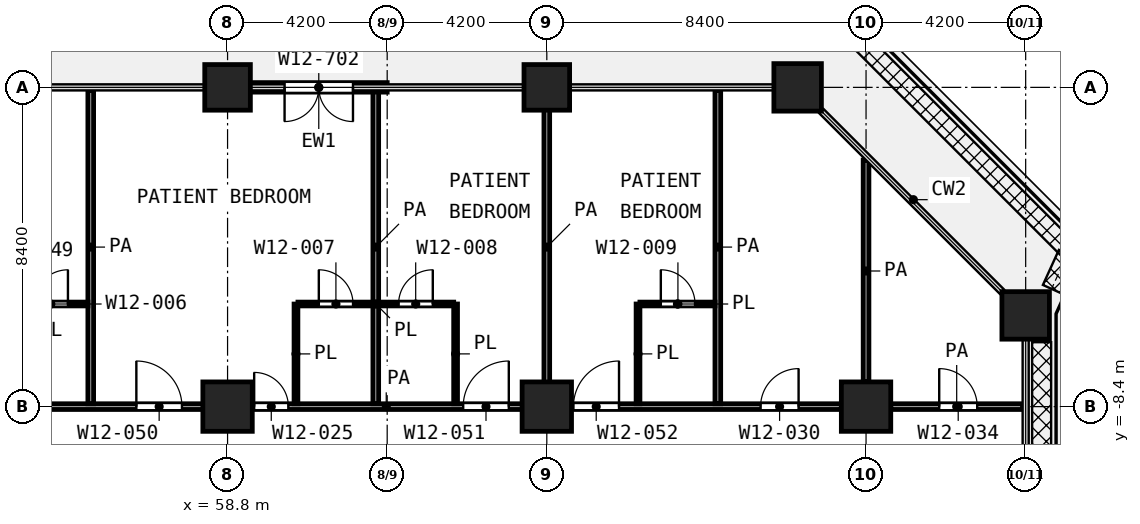
"""IFC4 building model, lengths in metres.
Left out: names, types, materials, properties, quantities, classifications, styles, units other than length and angle.
Written with IfcOpenShell. Run it as: python <this file> out.ifc"""

import sys

from ifc_helpers import new_model, si_unit, direction, frame, frame_2d, origin, origin_2d, place, context, subcontext, project, spatial, rectangle, extrude, element, fill, save


model = new_model("IFC4")
c1 = context("Model", 3, precision=1e-05, world=origin(), true_north=direction((0.0, 1.0)))
c2 = subcontext(c1, "Body", "Model", "MODEL_VIEW")
j1 = project(units=[si_unit("LENGTHUNIT", "METRE"), si_unit("PLANEANGLEUNIT", "RADIAN")], contexts=[c1])
p1 = place(None, origin())
s1 = spatial("IfcSite", under=j1, at=p1, CompositionType="ELEMENT")
p2 = place(p1, origin())
s2 = spatial("IfcBuilding", under=s1, at=p2, CompositionType="ELEMENT")
p3 = place(p2, frame((0.0, 0.0, 56.0)))
s3 = spatial("IfcBuildingStorey", under=s2, at=p3, CompositionType="ELEMENT", Elevation=56.0)
for number, where, z_axis, x_axis in (
    (1, (58.8, 0.0, 0.0), (0.0, 0.0, 1.0), (1.0, 0.0, 0.0)),
    (2, (67.2, 0.0, 0.0), (0.0, 0.0, 1.0), (1.0, 0.0, 0.0)),
):
    element("IfcColumn", number, at=place(p3, frame(where, z_axis=z_axis, x_axis=x_axis)), inside=s3, PredefinedType="COLUMN", context=c2, shape_type="SweptSolid", body=[
        extrude(rectangle(XDim=1.2, YDim=1.2, at=origin_2d()), origin(), (0.0, 0.0, 1.0), 4.2),
    ])
for number, where, z_axis, x_axis in (
    (3, (73.8, 0.0, 0.0), (0.0, 0.0, 1.0), (1.0, 0.0, 0.0)),
    (4, (79.8, -6.0, 0.0), (0.0, 0.0, 1.0), (1.0, 0.0, 0.0)),
):
    element("IfcColumn", number, at=place(p3, frame(where, z_axis=z_axis, x_axis=x_axis)), inside=s3, PredefinedType="COLUMN", context=c2, shape_type="SweptSolid", body=[
        extrude(rectangle(XDim=1.25, YDim=1.25, at=origin_2d()), origin(), (0.0, 0.0, 1.0), 4.2),
    ])
for number, where, z_axis, x_axis in (
    (5, (58.8, -8.4, 0.0), (0.0, 0.0, 1.0), (1.0, 0.0, 0.0)),
    (6, (67.2, -8.4, 0.0), (0.0, 0.0, 1.0), (1.0, 0.0, 0.0)),
    (7, (75.6, -8.4, 0.0), (0.0, 0.0, 1.0), (1.0, 0.0, 0.0)),
):
    element("IfcColumn", number, at=place(p3, frame(where, z_axis=z_axis, x_axis=x_axis)), inside=s3, PredefinedType="COLUMN", context=c2, shape_type="SweptSolid", body=[
        extrude(rectangle(XDim=1.3, YDim=1.3, at=origin_2d()), origin(), (0.0, 0.0, 1.0), 4.2),
    ])
p4 = place(p3, frame((63.0, 0.0, 0.0), z_axis=(0.0, 0.0, 1.0), x_axis=(-1.0, 0.0, 0.0)))
e8 = element("IfcWall", 8, at=p4, inside=s3, PredefinedType="SOLIDWALL", context=c2, shape_type="SweptSolid", body=[
    extrude(rectangle(XDim=3.6, YDim=0.25, at=frame_2d((1.8, 0.0))), origin(), (0.0, 0.0, 1.0), 3.78),
])
p5 = place(p4, frame((0.9, 0.0, 0.0)))
e9 = element("IfcOpeningElement", 9, at=p5, cuts=e8, PredefinedType="OPENING", context=c2, shape_type="SweptSolid", body=[
    extrude(rectangle(XDim=1.8, YDim=2.1, at=frame_2d((0.9, 1.05))), frame((0.0, 0.135, 0.0), z_axis=(0.0, -1.0, 0.0), x_axis=(1.0, 0.0, 0.0)), (0.0, 0.0, 1.0), 0.27),
])
p6 = place(p3, frame((53.15, -5.7, 0.0), z_axis=(0.0, 0.0, 1.0), x_axis=(1.0, 0.0, 0.0)))
e10 = element("IfcWall", 10, at=p6, inside=s3, PredefinedType="PARTITIONING", context=c2, shape_type="SweptSolid", body=[
    extrude(rectangle(XDim=1.975, YDim=0.1, at=frame_2d((0.988, 0.0))), origin(), (0.0, 0.0, 1.0), 3.9),
])
p7 = place(p6, frame((0.55, 0.0, 0.0)))
e11 = element("IfcOpeningElement", 11, at=p7, cuts=e10, PredefinedType="OPENING", context=c2, shape_type="SweptSolid", body=[
    extrude(rectangle(XDim=0.9, YDim=2.1, at=frame_2d((0.45, 1.05))), frame((0.0, 0.06, 0.0), z_axis=(0.0, -1.0, 0.0), x_axis=(1.0, 0.0, 0.0)), (0.0, 0.0, 1.0), 0.12),
])
p8 = place(p3, frame((60.652, -5.7, 0.0), z_axis=(0.0, 0.0, 1.0), x_axis=(1.0, 0.0, 0.0)))
e12 = element("IfcWall", 12, at=p8, inside=s3, PredefinedType="PARTITIONING", context=c2, shape_type="SweptSolid", body=[
    extrude(rectangle(XDim=4.098, YDim=0.1, at=frame_2d((2.049, 0.0))), origin(), (0.0, 0.0, 1.0), 3.9),
])
p9 = place(p8, frame((0.549, 0.0, 0.0)))
e13 = element("IfcOpeningElement", 13, at=p9, cuts=e12, PredefinedType="OPENING", context=c2, shape_type="SweptSolid", body=[
    extrude(rectangle(XDim=0.9, YDim=2.1, at=frame_2d((0.45, 1.05))), frame((0.0, 0.06, 0.0), z_axis=(0.0, -1.0, 0.0), x_axis=(1.0, 0.0, 0.0)), (0.0, 0.0, 1.0), 0.12),
])
p10 = place(p8, frame((2.648, 0.0, 0.0)))
e14 = element("IfcOpeningElement", 14, at=p10, cuts=e12, PredefinedType="OPENING", context=c2, shape_type="SweptSolid", body=[
    extrude(rectangle(XDim=0.9, YDim=2.1, at=frame_2d((0.45, 1.05))), frame((0.0, 0.06, 0.0), z_axis=(0.0, -1.0, 0.0), x_axis=(1.0, 0.0, 0.0)), (0.0, 0.0, 1.0), 0.12),
])
p11 = place(p3, frame((69.65, -5.7, 0.0), z_axis=(0.0, 0.0, 1.0), x_axis=(1.0, 0.0, 0.0)))
e15 = element("IfcWall", 15, at=p11, inside=s3, PredefinedType="PARTITIONING", context=c2, shape_type="SweptSolid", body=[
    extrude(rectangle(XDim=1.975, YDim=0.1, at=frame_2d((0.988, 0.0))), origin(), (0.0, 0.0, 1.0), 3.9),
])
p12 = place(p11, frame((0.55, 0.0, 0.0)))
e16 = element("IfcOpeningElement", 16, at=p12, cuts=e15, PredefinedType="OPENING", context=c2, shape_type="SweptSolid", body=[
    extrude(rectangle(XDim=0.9, YDim=2.1, at=frame_2d((0.45, 1.05))), frame((0.0, 0.06, 0.0), z_axis=(0.0, -1.0, 0.0), x_axis=(1.0, 0.0, 0.0)), (0.0, 0.0, 1.0), 0.12),
])
p13 = place(p3, frame((60.6, -8.325, 0.0), z_axis=(0.0, 0.0, 1.0), x_axis=(0.0, 1.0, 0.0)))
e17 = element("IfcWall", 17, at=p13, inside=s3, PredefinedType="PARTITIONING", context=c2, shape_type="SweptSolid", body=[
    extrude(rectangle(XDim=2.624, YDim=0.1, at=frame_2d((1.312, 0.0))), origin(), (0.0, 0.0, 1.0), 3.9),
])
for number, where, z_axis, x_axis in (
    (18, (64.8, -8.325, 0.0), (0.0, 0.0, 1.0), (0.0, 1.0, 0.0)),
    (19, (69.6, -8.325, 0.0), (0.0, 0.0, 1.0), (0.0, 1.0, 0.0)),
):
    element("IfcWall", number, at=place(p3, frame(where, z_axis=z_axis, x_axis=x_axis)), inside=s3, PredefinedType="PARTITIONING", context=c2, shape_type="SweptSolid", body=[
        extrude(rectangle(XDim=2.625, YDim=0.1, at=frame_2d((1.312, 0.0))), origin(), (0.0, 0.0, 1.0), 3.9),
    ])
p14 = place(p3, frame((51.0, -8.4, 0.0), z_axis=(0.0, 0.0, 1.0), x_axis=(1.0, 0.0, 0.0)))
e20 = element("IfcWall", 20, at=p14, inside=s3, PredefinedType="PARTITIONING", context=c2, shape_type="SweptSolid", body=[
    extrude(rectangle(XDim=23.95, YDim=0.15, at=frame_2d((11.975, 0.0))), origin(), (0.0, 0.0, 1.0), 3.9),
])
p15 = place(p14, frame((5.4, 0.0, 0.0)))
e21 = element("IfcOpeningElement", 21, at=p15, cuts=e20, PredefinedType="OPENING", context=c2, shape_type="SweptSolid", body=[
    extrude(rectangle(XDim=1.2, YDim=2.1, at=frame_2d((0.6, 1.05))), frame((0.0, 0.085, 0.0), z_axis=(0.0, -1.0, 0.0), x_axis=(1.0, 0.0, 0.0)), (0.0, 0.0, 1.0), 0.17),
])
p16 = place(p14, frame((8.5, 0.0, 0.0)))
e22 = element("IfcOpeningElement", 22, at=p16, cuts=e20, PredefinedType="OPENING", context=c2, shape_type="SweptSolid", body=[
    extrude(rectangle(XDim=0.9, YDim=2.1, at=frame_2d((0.45, 1.05))), frame((0.0, 0.085, 0.0), z_axis=(0.0, -1.0, 0.0), x_axis=(1.0, 0.0, 0.0)), (0.0, 0.0, 1.0), 0.17),
])
p17 = place(p14, frame((14.0, 0.0, 0.0)))
e23 = element("IfcOpeningElement", 23, at=p17, cuts=e20, PredefinedType="OPENING", context=c2, shape_type="SweptSolid", body=[
    extrude(rectangle(XDim=1.2, YDim=2.1, at=frame_2d((0.6, 1.05))), frame((0.0, 0.085, 0.0), z_axis=(0.0, -1.0, 0.0), x_axis=(1.0, 0.0, 0.0)), (0.0, 0.0, 1.0), 0.17),
])
p18 = place(p14, frame((16.9, 0.0, 0.0)))
e24 = element("IfcOpeningElement", 24, at=p18, cuts=e20, PredefinedType="OPENING", context=c2, shape_type="SweptSolid", body=[
    extrude(rectangle(XDim=1.2, YDim=2.1, at=frame_2d((0.6, 1.05))), frame((0.0, 0.085, 0.0), z_axis=(0.0, -1.0, 0.0), x_axis=(1.0, 0.0, 0.0)), (0.0, 0.0, 1.0), 0.17),
])
p19 = place(p14, frame((21.825, 0.0, 0.0)))
e25 = element("IfcOpeningElement", 25, at=p19, cuts=e20, PredefinedType="OPENING", context=c2, shape_type="SweptSolid", body=[
    extrude(rectangle(XDim=1.0, YDim=2.1, at=frame_2d((0.5, 1.05))), frame((0.0, 0.085, 0.0), z_axis=(0.0, -1.0, 0.0), x_axis=(1.0, 0.0, 0.0)), (0.0, 0.0, 1.0), 0.17),
])
p20 = place(p3, frame((76.25, -8.4, 0.0), z_axis=(0.0, 0.0, 1.0), x_axis=(1.0, 0.0, 0.0)))
e26 = element("IfcWall", 26, at=p20, inside=s3, PredefinedType="PARTITIONING", context=c2, shape_type="SweptSolid", body=[
    extrude(rectangle(XDim=3.47, YDim=0.15, at=frame_2d((1.735, 0.0))), origin(), (0.0, 0.0, 1.0), 3.9),
])
p21 = place(p20, frame((1.275, 0.0, 0.0)))
e27 = element("IfcOpeningElement", 27, at=p21, cuts=e26, PredefinedType="OPENING", context=c2, shape_type="SweptSolid", body=[
    extrude(rectangle(XDim=1.0, YDim=2.1, at=frame_2d((0.5, 1.05))), frame((0.0, 0.085, 0.0), z_axis=(0.0, -1.0, 0.0), x_axis=(1.0, 0.0, 0.0)), (0.0, 0.0, 1.0), 0.17),
])
for number, where, z_axis, x_axis in (
    (28, (55.2, -8.325, 0.0), (0.0, 0.0, 1.0), (0.0, 1.0, 0.0)),
    (29, (62.7, -8.325, 0.0), (0.0, 0.0, 1.0), (0.0, 1.0, 0.0)),
    (30, (67.2, -8.325, 0.0), (0.0, 0.0, 1.0), (0.0, 1.0, 0.0)),
    (31, (71.7, -8.325, 0.0), (0.0, 0.0, 1.0), (0.0, 1.0, 0.0)),
):
    element("IfcWall", number, at=place(p3, frame(where, z_axis=z_axis, x_axis=x_axis)), inside=s3, PredefinedType="PARTITIONING", context=c2, shape_type="SweptSolid", body=[
        extrude(rectangle(XDim=8.245, YDim=0.15, at=frame_2d((4.123, 0.0))), origin(), (0.0, 0.0, 1.0), 3.9),
    ])
p22 = place(p3, frame((75.6, -7.75, 0.0), z_axis=(0.0, 0.0, 1.0), x_axis=(0.0, 1.0, 0.0)))
e32 = element("IfcWall", 32, at=p22, inside=s3, PredefinedType="PARTITIONING", context=c2, shape_type="SweptSolid", body=[
    extrude(rectangle(XDim=5.837, YDim=0.15, at=frame_2d((2.918, 0.0))), origin(), (0.0, 0.0, 1.0), 3.9),
])
p23 = place(p5, origin())
e33 = element("IfcDoor", 33, at=p23, inside=s3, OperationType="DOUBLE_DOOR_SINGLE_SWING", PredefinedType="DOOR", context=c2, shape_type="SweptSolid", body=[
    extrude(rectangle(XDim=1.8, YDim=2.1, at=frame_2d((0.9, 1.05))), frame((0.0, 0.025, 0.0), z_axis=(0.0, -1.0, 0.0), x_axis=(1.0, 0.0, 0.0)), (0.0, 0.0, 1.0), 0.05),
])
fill(e9, e33)
p24 = place(p7, origin())
e34 = element("IfcDoor", 34, at=p24, inside=s3, OperationType="SINGLE_SWING_RIGHT", PredefinedType="DOOR", context=c2, shape_type="SweptSolid", body=[
    extrude(rectangle(XDim=0.9, YDim=2.1, at=frame_2d((0.45, 1.05))), frame((0.0, 0.025, 0.0), z_axis=(0.0, -1.0, 0.0), x_axis=(1.0, 0.0, 0.0)), (0.0, 0.0, 1.0), 0.05),
])
fill(e11, e34)
p25 = place(p15, origin())
e35 = element("IfcDoor", 35, at=p25, inside=s3, OperationType="SINGLE_SWING_LEFT", PredefinedType="DOOR", context=c2, shape_type="SweptSolid", body=[
    extrude(rectangle(XDim=1.2, YDim=2.1, at=frame_2d((0.6, 1.05))), frame((0.0, 0.025, 0.0), z_axis=(0.0, -1.0, 0.0), x_axis=(1.0, 0.0, 0.0)), (0.0, 0.0, 1.0), 0.05),
])
fill(e21, e35)
p26 = place(p16, origin())
e36 = element("IfcDoor", 36, at=p26, inside=s3, OperationType="SINGLE_SWING_LEFT", PredefinedType="DOOR", context=c2, shape_type="SweptSolid", body=[
    extrude(rectangle(XDim=0.9, YDim=2.1, at=frame_2d((0.45, 1.05))), frame((0.0, 0.025, 0.0), z_axis=(0.0, -1.0, 0.0), x_axis=(1.0, 0.0, 0.0)), (0.0, 0.0, 1.0), 0.05),
])
fill(e22, e36)
p27 = place(p9, origin())
e37 = element("IfcDoor", 37, at=p27, inside=s3, OperationType="SINGLE_SWING_LEFT", PredefinedType="DOOR", context=c2, shape_type="SweptSolid", body=[
    extrude(rectangle(XDim=0.9, YDim=2.1, at=frame_2d((0.45, 1.05))), frame((0.0, 0.025, 0.0), z_axis=(0.0, -1.0, 0.0), x_axis=(1.0, 0.0, 0.0)), (0.0, 0.0, 1.0), 0.05),
])
fill(e13, e37)
p28 = place(p17, origin())
e38 = element("IfcDoor", 38, at=p28, inside=s3, OperationType="SINGLE_SWING_RIGHT", PredefinedType="DOOR", context=c2, shape_type="SweptSolid", body=[
    extrude(rectangle(XDim=1.2, YDim=2.1, at=frame_2d((0.6, 1.05))), frame((0.0, 0.025, 0.0), z_axis=(0.0, -1.0, 0.0), x_axis=(1.0, 0.0, 0.0)), (0.0, 0.0, 1.0), 0.05),
])
fill(e23, e38)
p29 = place(p10, origin())
e39 = element("IfcDoor", 39, at=p29, inside=s3, OperationType="SINGLE_SWING_RIGHT", PredefinedType="DOOR", context=c2, shape_type="SweptSolid", body=[
    extrude(rectangle(XDim=0.9, YDim=2.1, at=frame_2d((0.45, 1.05))), frame((0.0, 0.025, 0.0), z_axis=(0.0, -1.0, 0.0), x_axis=(1.0, 0.0, 0.0)), (0.0, 0.0, 1.0), 0.05),
])
fill(e14, e39)
p30 = place(p18, origin())
e40 = element("IfcDoor", 40, at=p30, inside=s3, OperationType="SINGLE_SWING_RIGHT", PredefinedType="DOOR", context=c2, shape_type="SweptSolid", body=[
    extrude(rectangle(XDim=1.2, YDim=2.1, at=frame_2d((0.6, 1.05))), frame((0.0, 0.025, 0.0), z_axis=(0.0, -1.0, 0.0), x_axis=(1.0, 0.0, 0.0)), (0.0, 0.0, 1.0), 0.05),
])
fill(e24, e40)
p31 = place(p12, origin())
e41 = element("IfcDoor", 41, at=p31, inside=s3, OperationType="SINGLE_SWING_LEFT", PredefinedType="DOOR", context=c2, shape_type="SweptSolid", body=[
    extrude(rectangle(XDim=0.9, YDim=2.1, at=frame_2d((0.45, 1.05))), frame((0.0, 0.025, 0.0), z_axis=(0.0, -1.0, 0.0), x_axis=(1.0, 0.0, 0.0)), (0.0, 0.0, 1.0), 0.05),
])
fill(e16, e41)
p32 = place(p19, origin())
e42 = element("IfcDoor", 42, at=p32, inside=s3, OperationType="SINGLE_SWING_RIGHT", PredefinedType="DOOR", context=c2, shape_type="SweptSolid", body=[
    extrude(rectangle(XDim=1.0, YDim=2.1, at=frame_2d((0.5, 1.05))), frame((0.0, 0.025, 0.0), z_axis=(0.0, -1.0, 0.0), x_axis=(1.0, 0.0, 0.0)), (0.0, 0.0, 1.0), 0.05),
])
fill(e25, e42)
p33 = place(p21, origin())
e43 = element("IfcDoor", 43, at=p33, inside=s3, OperationType="SINGLE_SWING_LEFT", PredefinedType="DOOR", context=c2, shape_type="SweptSolid", body=[
    extrude(rectangle(XDim=1.0, YDim=2.1, at=frame_2d((0.5, 1.05))), frame((0.0, 0.025, 0.0), z_axis=(0.0, -1.0, 0.0), x_axis=(1.0, 0.0, 0.0)), (0.0, 0.0, 1.0), 0.05),
])
fill(e27, e43)
save(model, sys.argv[1])
